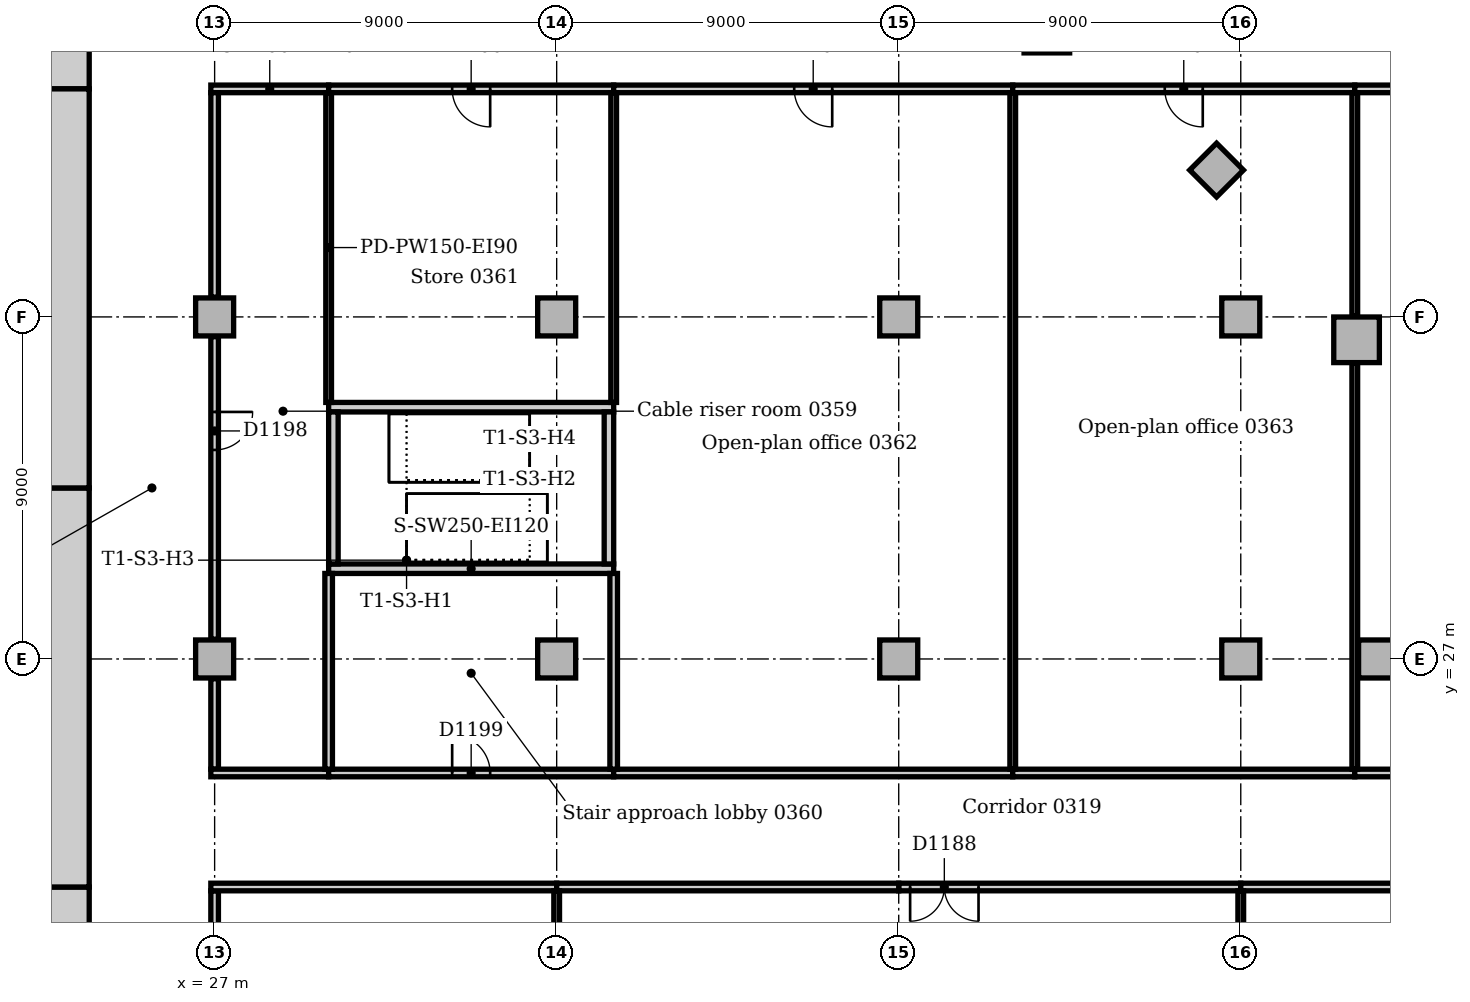
"""IFC4 building model, lengths in metres.
Left out: names, types, materials, properties, quantities, classifications, styles, units other than length and angle.
Written with IfcOpenShell. Run it as: python <this file> out.ifc"""

import sys

from ifc_helpers import new_model, si_unit, direction, frame, frame_2d, origin, origin_2d, place, context, subcontext, project, spatial, rectangle, extrude, element, fill, save


model = new_model("IFC4")
c1 = context("Model", 3, precision=1e-05, world=origin(), true_north=direction((0.0, 1.0)))
c2 = subcontext(c1, "Body", "Model", "MODEL_VIEW")
j1 = project(units=[si_unit("LENGTHUNIT", "METRE"), si_unit("PLANEANGLEUNIT", "RADIAN")], contexts=[c1])
p1 = place(None, origin())
s1 = spatial("IfcSite", under=j1, at=p1, CompositionType="ELEMENT")
p2 = place(p1, origin())
s2 = spatial("IfcBuilding", under=s1, at=p2, CompositionType="ELEMENT")
p3 = place(p2, frame((0.0, 0.0, 16.0)))
s3 = spatial("IfcBuildingStorey", under=s2, at=p3, CompositionType="ELEMENT", Elevation=16.0)
for number, where, z_axis, x_axis in (
    (1, (3.9, 20.4, 0.0), (0.0, 0.0, 1.0), (1.0, 0.0, 0.0)),
    (2, (23.7, 42.6, 0.0), (0.0, 0.0, 1.0), (-1.0, 0.0, 0.0)),
):
    element("IfcWall", number, at=place(p3, frame(where, z_axis=z_axis, x_axis=x_axis)), inside=s3, PredefinedType="SOLIDWALL", context=c2, shape_type="SweptSolid", body=[
        extrude(rectangle(XDim=19.8, YDim=1.2, at=frame_2d((9.9, 0.0))), origin(), (0.0, 0.0, 1.0), 5.0),
    ])
p4 = place(p3, frame((23.1, 21.0, 0.0), z_axis=(0.0, 0.0, 1.0), x_axis=(0.0, 1.0, 0.0)))
e3 = element("IfcWall", 3, at=p4, inside=s3, PredefinedType="SOLIDWALL", context=c2, shape_type="SweptSolid", body=[
    extrude(rectangle(XDim=10.5, YDim=1.2, at=frame_2d((5.25, 0.0))), origin(), (0.0, 0.0, 1.0), 5.0),
])
p5 = place(p4, frame((4.35, 0.0, 0.0)))
e4 = element("IfcOpeningElement", 4, at=p5, cuts=e3, PredefinedType="OPENING", context=c2, shape_type="SweptSolid", body=[
    extrude(rectangle(XDim=1.8, YDim=2.1, at=frame_2d((0.9, 1.05))), frame((0.0, 0.61, 0.0), z_axis=(0.0, -1.0, 0.0), x_axis=(1.0, 0.0, 0.0)), (0.0, 0.0, 1.0), 1.22),
])
p6 = place(p3, frame((23.1, 31.5, 0.0), z_axis=(0.0, 0.0, 1.0), x_axis=(0.0, 1.0, 0.0)))
e5 = element("IfcWall", 5, at=p6, inside=s3, PredefinedType="SOLIDWALL", context=c2, shape_type="SweptSolid", body=[
    extrude(rectangle(XDim=10.5, YDim=1.2, at=frame_2d((5.25, 0.0))), origin(), (0.0, 0.0, 1.0), 5.0),
])
p7 = place(p6, frame((3.15, 0.0, 0.0)))
e6 = element("IfcOpeningElement", 6, at=p7, cuts=e5, PredefinedType="OPENING", context=c2, shape_type="SweptSolid", body=[
    extrude(rectangle(XDim=1.0, YDim=2.1, at=frame_2d((0.5, 1.05))), frame((0.0, 0.61, 0.0), z_axis=(0.0, -1.0, 0.0), x_axis=(1.0, 0.0, 0.0)), (0.0, 0.0, 1.0), 1.22),
])
p8 = place(p6, frame((5.2, 0.0, 0.0)))
e7 = element("IfcOpeningElement", 7, at=p8, cuts=e5, PredefinedType="OPENING", context=c2, shape_type="SweptSolid", body=[
    extrude(rectangle(XDim=1.0, YDim=2.1, at=frame_2d((0.5, 1.05))), frame((0.0, 0.61, 0.0), z_axis=(0.0, -1.0, 0.0), x_axis=(1.0, 0.0, 0.0)), (0.0, 0.0, 1.0), 1.22),
])
for number, where, z_axis, x_axis in (
    (8, (30.0, 29.375, 0.0), (0.0, 0.0, 1.0), (1.0, 0.0, 0.0)),
    (9, (37.5, 33.625, 0.0), (0.0, 0.0, 1.0), (-1.0, 0.0, 0.0)),
):
    element("IfcWall", number, at=place(p3, frame(where, z_axis=z_axis, x_axis=x_axis)), inside=s3, PredefinedType="SOLIDWALL", context=c2, shape_type="SweptSolid", body=[
        extrude(rectangle(XDim=7.5, YDim=0.25, at=frame_2d((3.75, 0.0))), origin(), (0.0, 0.0, 1.0), 5.0),
    ])
for number, where, z_axis, x_axis in (
    (10, (37.375, 29.5, 0.0), (0.0, 0.0, 1.0), (0.0, 1.0, 0.0)),
    (11, (30.125, 33.5, 0.0), (0.0, 0.0, 1.0), (0.0, -1.0, 0.0)),
):
    element("IfcWall", number, at=place(p3, frame(where, z_axis=z_axis, x_axis=x_axis)), inside=s3, PredefinedType="SOLIDWALL", context=c2, shape_type="SweptSolid", body=[
        extrude(rectangle(XDim=4.0, YDim=0.25, at=frame_2d((2.0, 0.0))), origin(), (0.0, 0.0, 1.0), 5.0),
    ])
for number, where, z_axis, x_axis in (
    (12, (57.047, 35.398, 0.0), (0.0, 0.0, 1.0), (1.0, 0.0, 0.0)),
    (13, (48.898, 43.547, 0.0), (0.0, 0.0, 1.0), (1.0, 0.0, 0.0)),
):
    element("IfcColumn", number, at=place(p3, frame(where, z_axis=z_axis, x_axis=x_axis)), inside=s3, PredefinedType="COLUMN", context=c2, shape_type="SweptSolid", body=[
        extrude(rectangle(XDim=1.2, YDim=1.2, at=origin_2d()), origin(), (0.0, 0.0, 1.0), 4.7),
    ])
for number, where, z_axis, x_axis in (
    (14, (57.6, 27.0, 0.0), (0.0, 0.0, 1.0), (1.0, 0.0, 0.0)),
    (15, (53.364, 39.864, 0.0), (0.0, 0.0, 1.0), (0.707, 0.707, 0.0)),
    (16, (27.0, 27.0, 0.0), (0.0, 0.0, 1.0), (1.0, 0.0, 0.0)),
    (17, (27.0, 36.0, 0.0), (0.0, 0.0, 1.0), (1.0, 0.0, 0.0)),
    (18, (36.0, 27.0, 0.0), (0.0, 0.0, 1.0), (1.0, 0.0, 0.0)),
    (19, (36.0, 36.0, 0.0), (0.0, 0.0, 1.0), (1.0, 0.0, 0.0)),
    (20, (45.0, 27.0, 0.0), (0.0, 0.0, 1.0), (1.0, 0.0, 0.0)),
    (21, (45.0, 36.0, 0.0), (0.0, 0.0, 1.0), (1.0, 0.0, 0.0)),
    (22, (54.0, 27.0, 0.0), (0.0, 0.0, 1.0), (1.0, 0.0, 0.0)),
    (23, (54.0, 36.0, 0.0), (0.0, 0.0, 1.0), (1.0, 0.0, 0.0)),
):
    element("IfcColumn", number, at=place(p3, frame(where, z_axis=z_axis, x_axis=x_axis)), inside=s3, PredefinedType="COLUMN", context=c2, shape_type="SweptSolid", body=[
        extrude(rectangle(XDim=1.0, YDim=1.0, at=origin_2d()), origin(), (0.0, 0.0, 1.0), 4.7),
    ])
p9 = place(p3, frame((26.9, 42.0, 0.0), z_axis=(0.0, 0.0, 1.0), x_axis=(1.0, 0.0, 0.0)))
e24 = element("IfcWall", 24, at=p9, inside=s3, PredefinedType="PARTITIONING", context=c2, shape_type="SweptSolid", body=[
    extrude(rectangle(XDim=3.1, YDim=0.2, at=frame_2d((1.55, 0.0))), origin(), (0.0, 0.0, 1.0), 4.7),
])
p10 = place(p3, frame((30.0, 42.0, 0.0), z_axis=(0.0, 0.0, 1.0), x_axis=(1.0, 0.0, 0.0)))
e25 = element("IfcWall", 25, at=p10, inside=s3, PredefinedType="PARTITIONING", context=c2, shape_type="SweptSolid", body=[
    extrude(rectangle(XDim=7.5, YDim=0.2, at=frame_2d((3.75, 0.0))), origin(), (0.0, 0.0, 1.0), 4.7),
])
p11 = place(p10, frame((3.25, 0.0, 0.0)))
e26 = element("IfcOpeningElement", 26, at=p11, cuts=e25, PredefinedType="OPENING", context=c2, shape_type="SweptSolid", body=[
    extrude(rectangle(XDim=1.0, YDim=2.1, at=frame_2d((0.5, 1.05))), frame((0.0, 0.11, 0.0), z_axis=(0.0, -1.0, 0.0), x_axis=(1.0, 0.0, 0.0)), (0.0, 0.0, 1.0), 0.22),
])
p12 = place(p3, frame((37.5, 42.0, 0.0), z_axis=(0.0, 0.0, 1.0), x_axis=(1.0, 0.0, 0.0)))
e27 = element("IfcWall", 27, at=p12, inside=s3, PredefinedType="PARTITIONING", context=c2, shape_type="SweptSolid", body=[
    extrude(rectangle(XDim=10.5, YDim=0.2, at=frame_2d((5.25, 0.0))), origin(), (0.0, 0.0, 1.0), 4.7),
])
p13 = place(p12, frame((4.75, 0.0, 0.0)))
e28 = element("IfcOpeningElement", 28, at=p13, cuts=e27, PredefinedType="OPENING", context=c2, shape_type="SweptSolid", body=[
    extrude(rectangle(XDim=1.0, YDim=2.1, at=frame_2d((0.5, 1.05))), frame((0.0, 0.11, 0.0), z_axis=(0.0, -1.0, 0.0), x_axis=(1.0, 0.0, 0.0)), (0.0, 0.0, 1.0), 0.22),
])
p14 = place(p3, frame((48.0, 42.0, 0.0), z_axis=(0.0, 0.0, 1.0), x_axis=(1.0, 0.0, 0.0)))
e29 = element("IfcWall", 29, at=p14, inside=s3, PredefinedType="PARTITIONING", context=c2, shape_type="SweptSolid", body=[
    extrude(rectangle(XDim=9.0, YDim=0.2, at=frame_2d((4.5, 0.0))), origin(), (0.0, 0.0, 1.0), 4.7),
])
p15 = place(p14, frame((4.0, 0.0, 0.0)))
e30 = element("IfcOpeningElement", 30, at=p15, cuts=e29, PredefinedType="OPENING", context=c2, shape_type="SweptSolid", body=[
    extrude(rectangle(XDim=1.0, YDim=2.1, at=frame_2d((0.5, 1.05))), frame((0.0, 0.11, 0.0), z_axis=(0.0, -1.0, 0.0), x_axis=(1.0, 0.0, 0.0)), (0.0, 0.0, 1.0), 0.22),
])
p16 = place(p3, frame((57.0, 42.0, 0.0), z_axis=(0.0, 0.0, 1.0), x_axis=(1.0, 0.0, 0.0)))
e31 = element("IfcWall", 31, at=p16, inside=s3, PredefinedType="PARTITIONING", context=c2, shape_type="SweptSolid", body=[
    extrude(rectangle(XDim=8.6, YDim=0.2, at=frame_2d((4.3, 0.0))), origin(), (0.0, 0.0, 1.0), 4.7),
])
p17 = place(p16, frame((4.0, 0.0, 0.0)))
e32 = element("IfcOpeningElement", 32, at=p17, cuts=e31, PredefinedType="OPENING", context=c2, shape_type="SweptSolid", body=[
    extrude(rectangle(XDim=1.0, YDim=2.1, at=frame_2d((0.5, 1.05))), frame((0.0, 0.11, 0.0), z_axis=(0.0, -1.0, 0.0), x_axis=(1.0, 0.0, 0.0)), (0.0, 0.0, 1.0), 0.22),
])
for number, where, z_axis, x_axis in (
    (33, (27.0, 18.52, 0.0), (0.0, 0.0, 1.0), (0.0, 1.0, 0.0)),
    (34, (27.0, 24.1, 0.0), (0.0, 0.0, 1.0), (0.0, 1.0, 0.0)),
):
    element("IfcWall", number, at=place(p3, frame(where, z_axis=z_axis, x_axis=x_axis)), inside=s3, PredefinedType="PARTITIONING", context=c2, shape_type="SweptSolid", body=[
        extrude(rectangle(XDim=2.38, YDim=0.2, at=frame_2d((1.19, 0.0))), origin(), (0.0, 0.0, 1.0), 4.7),
    ])
p18 = place(p3, frame((27.0, 27.52, 0.0), z_axis=(0.0, 0.0, 1.0), x_axis=(0.0, 1.0, 0.0)))
e35 = element("IfcWall", 35, at=p18, inside=s3, PredefinedType="PARTITIONING", context=c2, shape_type="SweptSolid", body=[
    extrude(rectangle(XDim=7.96, YDim=0.2, at=frame_2d((3.98, 0.0))), origin(), (0.0, 0.0, 1.0), 4.7),
])
p19 = place(p18, frame((4.98, 0.0, 0.0)))
e36 = element("IfcOpeningElement", 36, at=p19, cuts=e35, PredefinedType="OPENING", context=c2, shape_type="SweptSolid", body=[
    extrude(rectangle(XDim=1.0, YDim=2.1, at=frame_2d((0.5, 1.05))), frame((0.0, 0.11, 0.0), z_axis=(0.0, -1.0, 0.0), x_axis=(1.0, 0.0, 0.0)), (0.0, 0.0, 1.0), 0.22),
])
p20 = place(p3, frame((27.0, 36.52, 0.0), z_axis=(0.0, 0.0, 1.0), x_axis=(0.0, 1.0, 0.0)))
e37 = element("IfcWall", 37, at=p20, inside=s3, PredefinedType="PARTITIONING", context=c2, shape_type="SweptSolid", body=[
    extrude(rectangle(XDim=5.38, YDim=0.2, at=frame_2d((2.69, 0.0))), origin(), (0.0, 0.0, 1.0), 4.7),
])
p21 = place(p3, frame((26.9, 21.0, 0.0), z_axis=(0.0, 0.0, 1.0), x_axis=(1.0, 0.0, 0.0)))
e38 = element("IfcWall", 38, at=p21, inside=s3, PredefinedType="PARTITIONING", context=c2, shape_type="SweptSolid", body=[
    extrude(rectangle(XDim=9.1, YDim=0.2, at=frame_2d((4.55, 0.0))), origin(), (0.0, 0.0, 1.0), 4.7),
])
p22 = place(p3, frame((45.0, 21.0, 0.0), z_axis=(0.0, 0.0, 1.0), x_axis=(1.0, 0.0, 0.0)))
e39 = element("IfcWall", 39, at=p22, inside=s3, PredefinedType="PARTITIONING", context=c2, shape_type="SweptSolid", body=[
    extrude(rectangle(XDim=9.0, YDim=0.2, at=frame_2d((4.5, 0.0))), origin(), (0.0, 0.0, 1.0), 4.7),
])
p23 = place(p22, frame((0.3, 0.0, 0.0)))
e40 = element("IfcOpeningElement", 40, at=p23, cuts=e39, PredefinedType="OPENING", context=c2, shape_type="SweptSolid", body=[
    extrude(rectangle(XDim=1.8, YDim=2.1, at=frame_2d((0.9, 1.05))), frame((0.0, 0.11, 0.0), z_axis=(0.0, -1.0, 0.0), x_axis=(1.0, 0.0, 0.0)), (0.0, 0.0, 1.0), 0.22),
])
p24 = place(p3, frame((36.0, 21.0, 0.0), z_axis=(0.0, 0.0, 1.0), x_axis=(1.0, 0.0, 0.0)))
e41 = element("IfcWall", 41, at=p24, inside=s3, PredefinedType="PARTITIONING", context=c2, shape_type="SweptSolid", body=[
    extrude(rectangle(XDim=9.0, YDim=0.2, at=frame_2d((4.5, 0.0))), origin(), (0.0, 0.0, 1.0), 4.7),
])
p25 = place(p3, frame((54.0, 21.0, 0.0), z_axis=(0.0, 0.0, 1.0), x_axis=(1.0, 0.0, 0.0)))
e42 = element("IfcWall", 42, at=p25, inside=s3, PredefinedType="PARTITIONING", context=c2, shape_type="SweptSolid", body=[
    extrude(rectangle(XDim=11.6, YDim=0.2, at=frame_2d((5.8, 0.0))), origin(), (0.0, 0.0, 1.0), 4.7),
])
p26 = place(p3, frame((26.9, 24.0, 0.0), z_axis=(0.0, 0.0, 1.0), x_axis=(1.0, 0.0, 0.0)))
e43 = element("IfcWall", 43, at=p26, inside=s3, PredefinedType="PARTITIONING", context=c2, shape_type="SweptSolid", body=[
    extrude(rectangle(XDim=3.1, YDim=0.2, at=frame_2d((1.55, 0.0))), origin(), (0.0, 0.0, 1.0), 4.7),
])
p27 = place(p3, frame((30.0, 24.0, 0.0), z_axis=(0.0, 0.0, 1.0), x_axis=(1.0, 0.0, 0.0)))
e44 = element("IfcWall", 44, at=p27, inside=s3, PredefinedType="PARTITIONING", context=c2, shape_type="SweptSolid", body=[
    extrude(rectangle(XDim=7.5, YDim=0.2, at=frame_2d((3.75, 0.0))), origin(), (0.0, 0.0, 1.0), 4.7),
])
p28 = place(p27, frame((3.25, 0.0, 0.0)))
e45 = element("IfcOpeningElement", 45, at=p28, cuts=e44, PredefinedType="OPENING", context=c2, shape_type="SweptSolid", body=[
    extrude(rectangle(XDim=1.0, YDim=2.1, at=frame_2d((0.5, 1.05))), frame((0.0, 0.11, 0.0), z_axis=(0.0, -1.0, 0.0), x_axis=(1.0, 0.0, 0.0)), (0.0, 0.0, 1.0), 0.22),
])
p29 = place(p3, frame((37.5, 24.0, 0.0), z_axis=(0.0, 0.0, 1.0), x_axis=(1.0, 0.0, 0.0)))
e46 = element("IfcWall", 46, at=p29, inside=s3, PredefinedType="PARTITIONING", context=c2, shape_type="SweptSolid", body=[
    extrude(rectangle(XDim=10.5, YDim=0.2, at=frame_2d((5.25, 0.0))), origin(), (0.0, 0.0, 1.0), 4.7),
])
p30 = place(p3, frame((48.0, 24.0, 0.0), z_axis=(0.0, 0.0, 1.0), x_axis=(1.0, 0.0, 0.0)))
e47 = element("IfcWall", 47, at=p30, inside=s3, PredefinedType="PARTITIONING", context=c2, shape_type="SweptSolid", body=[
    extrude(rectangle(XDim=9.0, YDim=0.2, at=frame_2d((4.5, 0.0))), origin(), (0.0, 0.0, 1.0), 4.7),
])
p31 = place(p3, frame((57.0, 24.0, 0.0), z_axis=(0.0, 0.0, 1.0), x_axis=(1.0, 0.0, 0.0)))
e48 = element("IfcWall", 48, at=p31, inside=s3, PredefinedType="PARTITIONING", context=c2, shape_type="SweptSolid", body=[
    extrude(rectangle(XDim=8.6, YDim=0.2, at=frame_2d((4.3, 0.0))), origin(), (0.0, 0.0, 1.0), 4.7),
])
for number, where, z_axis, x_axis in (
    (49, (36.0, 18.52, 0.0), (0.0, 0.0, 1.0), (0.0, 1.0, 0.0)),
    (50, (54.0, 18.52, 0.0), (0.0, 0.0, 1.0), (0.0, 1.0, 0.0)),
):
    element("IfcWall", number, at=place(p3, frame(where, z_axis=z_axis, x_axis=x_axis)), inside=s3, PredefinedType="PARTITIONING", context=c2, shape_type="SweptSolid", body=[
        extrude(rectangle(XDim=2.38, YDim=0.15, at=frame_2d((1.19, 0.0))), origin(), (0.0, 0.0, 1.0), 4.7),
    ])
p32 = place(p3, frame((30.0, 24.1, 0.0), z_axis=(0.0, 0.0, 1.0), x_axis=(0.0, 1.0, 0.0)))
e51 = element("IfcWall", 51, at=p32, inside=s3, PredefinedType="PARTITIONING", context=c2, shape_type="SweptSolid", body=[
    extrude(rectangle(XDim=5.15, YDim=0.2, at=frame_2d((2.575, 0.0))), origin(), (0.0, 0.0, 1.0), 4.7),
])
p33 = place(p3, frame((30.0, 33.75, 0.0), z_axis=(0.0, 0.0, 1.0), x_axis=(0.0, 1.0, 0.0)))
e52 = element("IfcWall", 52, at=p33, inside=s3, PredefinedType="PARTITIONING", context=c2, shape_type="SweptSolid", body=[
    extrude(rectangle(XDim=8.15, YDim=0.15, at=frame_2d((4.075, 0.0))), origin(), (0.0, 0.0, 1.0), 4.7),
])
p34 = place(p3, frame((37.5, 24.1, 0.0), z_axis=(0.0, 0.0, 1.0), x_axis=(0.0, 1.0, 0.0)))
e53 = element("IfcWall", 53, at=p34, inside=s3, PredefinedType="PARTITIONING", context=c2, shape_type="SweptSolid", body=[
    extrude(rectangle(XDim=5.15, YDim=0.2, at=frame_2d((2.575, 0.0))), origin(), (0.0, 0.0, 1.0), 4.7),
])
p35 = place(p3, frame((37.5, 33.75, 0.0), z_axis=(0.0, 0.0, 1.0), x_axis=(0.0, 1.0, 0.0)))
e54 = element("IfcWall", 54, at=p35, inside=s3, PredefinedType="PARTITIONING", context=c2, shape_type="SweptSolid", body=[
    extrude(rectangle(XDim=8.15, YDim=0.15, at=frame_2d((4.075, 0.0))), origin(), (0.0, 0.0, 1.0), 4.7),
])
p36 = place(p3, frame((48.0, 24.1, 0.0), z_axis=(0.0, 0.0, 1.0), x_axis=(0.0, 1.0, 0.0)))
e55 = element("IfcWall", 55, at=p36, inside=s3, PredefinedType="PARTITIONING", context=c2, shape_type="SweptSolid", body=[
    extrude(rectangle(XDim=17.8, YDim=0.15, at=frame_2d((8.9, 0.0))), origin(), (0.0, 0.0, 1.0), 4.7),
])
p37 = place(p3, frame((57.0, 24.1, 0.0), z_axis=(0.0, 0.0, 1.0), x_axis=(0.0, 1.0, 0.0)))
e56 = element("IfcWall", 56, at=p37, inside=s3, PredefinedType="PARTITIONING", context=c2, shape_type="SweptSolid", body=[
    extrude(rectangle(XDim=10.678, YDim=0.15, at=frame_2d((5.339, 0.0))), origin(), (0.0, 0.0, 1.0), 4.7),
])
p38 = place(p3, frame((57.0, 36.018, 0.0), z_axis=(0.0, 0.0, 1.0), x_axis=(0.0, 1.0, 0.0)))
e57 = element("IfcWall", 57, at=p38, inside=s3, PredefinedType="PARTITIONING", context=c2, shape_type="SweptSolid", body=[
    extrude(rectangle(XDim=5.882, YDim=0.15, at=frame_2d((2.941, 0.0))), origin(), (0.0, 0.0, 1.0), 4.7),
])
p39 = place(p23, frame((1.8, 0.0, 0.0), z_axis=(0.0, 0.0, 1.0), x_axis=(-1.0, 0.0, 0.0)))
e58 = element("IfcDoor", 58, at=p39, inside=s3, OperationType="DOUBLE_DOOR_SINGLE_SWING", PredefinedType="DOOR", context=c2, shape_type="SweptSolid", body=[
    extrude(rectangle(XDim=1.8, YDim=2.1, at=frame_2d((0.9, 1.05))), frame((0.0, 0.025, 0.0), z_axis=(0.0, -1.0, 0.0), x_axis=(1.0, 0.0, 0.0)), (0.0, 0.0, 1.0), 0.05),
])
fill(e40, e58)
p40 = place(p19, frame((1.0, 0.0, 0.0), z_axis=(0.0, 0.0, 1.0), x_axis=(-1.0, 0.0, 0.0)))
e59 = element("IfcDoor", 59, at=p40, inside=s3, OperationType="SINGLE_SWING_LEFT", PredefinedType="DOOR", context=c2, shape_type="SweptSolid", body=[
    extrude(rectangle(XDim=1.0, YDim=2.1, at=frame_2d((0.5, 1.05))), frame((0.0, 0.025, 0.0), z_axis=(0.0, -1.0, 0.0), x_axis=(1.0, 0.0, 0.0)), (0.0, 0.0, 1.0), 0.05),
])
fill(e36, e59)
p41 = place(p28, origin())
e60 = element("IfcDoor", 60, at=p41, inside=s3, OperationType="SINGLE_SWING_LEFT", PredefinedType="DOOR", context=c2, shape_type="SweptSolid", body=[
    extrude(rectangle(XDim=1.0, YDim=2.1, at=frame_2d((0.5, 1.05))), frame((0.0, 0.025, 0.0), z_axis=(0.0, -1.0, 0.0), x_axis=(1.0, 0.0, 0.0)), (0.0, 0.0, 1.0), 0.05),
])
fill(e45, e60)
p42 = place(p11, frame((1.0, 0.0, 0.0), z_axis=(0.0, 0.0, 1.0), x_axis=(-1.0, 0.0, 0.0)))
e61 = element("IfcDoor", 61, at=p42, inside=s3, OperationType="SINGLE_SWING_LEFT", PredefinedType="DOOR", context=c2, shape_type="SweptSolid", body=[
    extrude(rectangle(XDim=1.0, YDim=2.1, at=frame_2d((0.5, 1.05))), frame((0.0, 0.025, 0.0), z_axis=(0.0, -1.0, 0.0), x_axis=(1.0, 0.0, 0.0)), (0.0, 0.0, 1.0), 0.05),
])
fill(e26, e61)
p43 = place(p13, frame((1.0, 0.0, 0.0), z_axis=(0.0, 0.0, 1.0), x_axis=(-1.0, 0.0, 0.0)))
e62 = element("IfcDoor", 62, at=p43, inside=s3, OperationType="SINGLE_SWING_LEFT", PredefinedType="DOOR", context=c2, shape_type="SweptSolid", body=[
    extrude(rectangle(XDim=1.0, YDim=2.1, at=frame_2d((0.5, 1.05))), frame((0.0, 0.025, 0.0), z_axis=(0.0, -1.0, 0.0), x_axis=(1.0, 0.0, 0.0)), (0.0, 0.0, 1.0), 0.05),
])
fill(e28, e62)
p44 = place(p15, frame((1.0, 0.0, 0.0), z_axis=(0.0, 0.0, 1.0), x_axis=(-1.0, 0.0, 0.0)))
e63 = element("IfcDoor", 63, at=p44, inside=s3, OperationType="SINGLE_SWING_LEFT", PredefinedType="DOOR", context=c2, shape_type="SweptSolid", body=[
    extrude(rectangle(XDim=1.0, YDim=2.1, at=frame_2d((0.5, 1.05))), frame((0.0, 0.025, 0.0), z_axis=(0.0, -1.0, 0.0), x_axis=(1.0, 0.0, 0.0)), (0.0, 0.0, 1.0), 0.05),
])
fill(e30, e63)
p45 = place(p5, origin())
e64 = element("IfcDoor", 64, at=p45, inside=s3, OperationType="DOUBLE_DOOR_DOUBLE_SWING", PredefinedType="DOOR", context=c2, shape_type="SweptSolid", body=[
    extrude(rectangle(XDim=1.8, YDim=2.1, at=frame_2d((0.9, 1.05))), frame((0.0, 0.025, 0.0), z_axis=(0.0, -1.0, 0.0), x_axis=(1.0, 0.0, 0.0)), (0.0, 0.0, 1.0), 0.05),
])
fill(e4, e64)
p46 = place(p7, frame((1.0, 0.0, 0.0), z_axis=(0.0, 0.0, 1.0), x_axis=(-1.0, 0.0, 0.0)))
e65 = element("IfcDoor", 65, at=p46, inside=s3, OperationType="SINGLE_SWING_RIGHT", PredefinedType="DOOR", context=c2, shape_type="SweptSolid", body=[
    extrude(rectangle(XDim=1.0, YDim=2.1, at=frame_2d((0.5, 1.05))), frame((0.0, 0.025, 0.0), z_axis=(0.0, -1.0, 0.0), x_axis=(1.0, 0.0, 0.0)), (0.0, 0.0, 1.0), 0.05),
])
fill(e6, e65)
p47 = place(p8, frame((1.0, 0.0, 0.0), z_axis=(0.0, 0.0, 1.0), x_axis=(-1.0, 0.0, 0.0)))
e66 = element("IfcDoor", 66, at=p47, inside=s3, OperationType="SINGLE_SWING_RIGHT", PredefinedType="DOOR", context=c2, shape_type="SweptSolid", body=[
    extrude(rectangle(XDim=1.0, YDim=2.1, at=frame_2d((0.5, 1.05))), frame((0.0, 0.025, 0.0), z_axis=(0.0, -1.0, 0.0), x_axis=(1.0, 0.0, 0.0)), (0.0, 0.0, 1.0), 0.05),
])
fill(e7, e66)
save(model, sys.argv[1])
